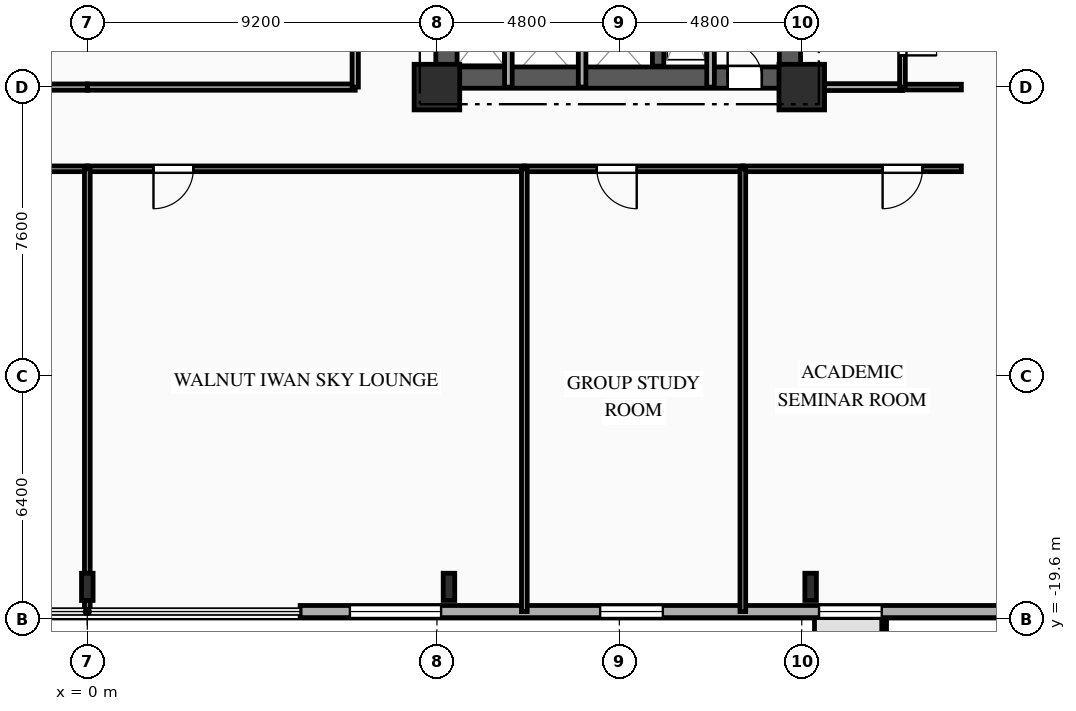
"""IFC4 building model, lengths in metres.
Left out: names, types, materials, properties, quantities, classifications, styles, units other than length and angle.
Written with IfcOpenShell. Run it as: python <this file> out.ifc"""

import sys

from ifc_helpers import new_model, si_unit, direction, frame, frame_2d, origin, origin_2d, place, context, subcontext, project, spatial, rectangle, i_section, extrude, element, fill, save


model = new_model("IFC4")
c1 = context("Model", 3, precision=1e-05, world=origin(), true_north=direction((0.0, 1.0)))
c2 = subcontext(c1, "Body", "Model", "MODEL_VIEW")
j1 = project(units=[si_unit("LENGTHUNIT", "METRE"), si_unit("PLANEANGLEUNIT", "RADIAN")], contexts=[c1])
p1 = place(None, origin())
s1 = spatial("IfcSite", under=j1, at=p1, CompositionType="ELEMENT")
p2 = place(p1, origin())
s2 = spatial("IfcBuilding", under=s1, at=p2, CompositionType="ELEMENT")
p3 = place(p2, frame((0.0, 0.0, 47.1)))
s3 = spatial("IfcBuildingStorey", under=s2, at=p3, CompositionType="ELEMENT", Elevation=47.1)
for number, where, z_axis, x_axis in (
    (1, (9.2, -5.6, 0.0), (0.0, 0.0, 1.0), (1.0, 0.0, 0.0)),
    (2, (18.8, -5.6, 0.0), (0.0, 0.0, 1.0), (1.0, 0.0, 0.0)),
):
    element("IfcColumn", number, at=place(p3, frame(where, z_axis=z_axis, x_axis=x_axis)), inside=s3, PredefinedType="COLUMN", context=c2, shape_type="SweptSolid", body=[
        extrude(rectangle(XDim=1.2, YDim=1.2, at=origin_2d()), origin(), (0.0, 0.0, 1.0), 3.35),
    ])
for number, where, z_axis, x_axis in (
    (3, (0.0, -18.75, 0.0), (0.0, 0.0, 1.0), (1.0, 0.0, 0.0)),
    (4, (9.517, -18.75, 0.0), (0.0, 0.0, 1.0), (1.0, 0.0, 0.0)),
    (5, (19.033, -18.75, 0.0), (0.0, 0.0, 1.0), (1.0, 0.0, 0.0)),
):
    element("IfcColumn", number, at=place(p3, frame(where, z_axis=z_axis, x_axis=x_axis)), inside=s3, PredefinedType="COLUMN", context=c2, shape_type="SweptSolid", body=[
        extrude(i_section(OverallWidth=0.304, OverallDepth=0.716, WebThickness=0.021, FlangeThickness=0.04, FilletRadius=0.027, at=origin_2d()), origin(), (0.0, 0.0, 1.0), 3.35),
    ])
p4 = place(p3, frame((29.2, -19.4, 0.0), z_axis=(0.0, 0.0, 1.0), x_axis=(-1.0, 0.0, 0.0)))
e6 = element("IfcWall", 6, at=p4, inside=s3, PredefinedType="SOLIDWALL", context=c2, shape_type="SweptSolid", body=[
    extrude(rectangle(XDim=23.6, YDim=0.32, at=frame_2d((11.8, 0.0))), origin(), (0.0, 0.0, 1.0), 3.035),
])
p5 = place(p4, frame((8.295, 0.0, 0.85)))
e7 = element("IfcOpeningElement", 7, at=p5, cuts=e6, PredefinedType="OPENING", context=c2, shape_type="SweptSolid", body=[
    extrude(rectangle(XDim=1.65, YDim=1.85, at=frame_2d((0.825, 0.925))), frame((0.0, 0.17, 0.0), z_axis=(0.0, -1.0, 0.0), x_axis=(1.0, 0.0, 0.0)), (0.0, 0.0, 1.0), 0.34),
])
p6 = place(p4, frame((14.055, 0.0, 0.85)))
e8 = element("IfcOpeningElement", 8, at=p6, cuts=e6, PredefinedType="OPENING", context=c2, shape_type="SweptSolid", body=[
    extrude(rectangle(XDim=1.65, YDim=1.85, at=frame_2d((0.825, 0.925))), frame((0.0, 0.17, 0.0), z_axis=(0.0, -1.0, 0.0), x_axis=(1.0, 0.0, 0.0)), (0.0, 0.0, 1.0), 0.34),
])
p7 = place(p4, frame((19.89, 0.0, 0.85)))
e9 = element("IfcOpeningElement", 9, at=p7, cuts=e6, PredefinedType="OPENING", context=c2, shape_type="SweptSolid", body=[
    extrude(rectangle(XDim=2.4, YDim=1.95, at=frame_2d((1.2, 0.975))), frame((0.0, 0.17, 0.0), z_axis=(0.0, -1.0, 0.0), x_axis=(1.0, 0.0, 0.0)), (0.0, 0.0, 1.0), 0.34),
])
p8 = place(p3, frame((9.2, -5.35, 0.0), z_axis=(0.0, 0.0, 1.0), x_axis=(1.0, 0.0, 0.0)))
e10 = element("IfcWall", 10, at=p8, inside=s3, PredefinedType="SHEAR", context=c2, shape_type="SweptSolid", body=[
    extrude(rectangle(XDim=9.6, YDim=0.56, at=frame_2d((4.8, 0.0))), origin(), (0.0, 0.0, 1.0), 3.035),
])
p9 = place(p8, frame((7.65, 0.0, 0.0)))
e11 = element("IfcOpeningElement", 11, at=p9, cuts=e10, PredefinedType="OPENING", context=c2, shape_type="SweptSolid", body=[
    extrude(rectangle(XDim=0.9, YDim=2.1, at=frame_2d((0.45, 1.05))), frame((0.0, 0.29, 0.0), z_axis=(0.0, -1.0, 0.0), x_axis=(1.0, 0.0, 0.0)), (0.0, 0.0, 1.0), 0.58),
])
p10 = place(p3, frame((9.45, -5.05, 0.0), z_axis=(0.0, 0.0, 1.0), x_axis=(0.0, 1.0, 0.0)))
e12 = element("IfcWall", 12, at=p10, inside=s3, PredefinedType="SHEAR", context=c2, shape_type="SweptSolid", body=[
    extrude(rectangle(XDim=10.1, YDim=0.56, at=frame_2d((5.05, 0.0))), origin(), (0.0, 0.0, 1.0), 3.035),
])
p11 = place(p10, frame((7.15, 0.0, 0.0)))
e13 = element("IfcOpeningElement", 13, at=p11, cuts=e12, PredefinedType="OPENING", context=c2, shape_type="SweptSolid", body=[
    extrude(rectangle(XDim=0.9, YDim=2.1, at=frame_2d((0.45, 1.05))), frame((0.0, 0.29, 0.0), z_axis=(0.0, -1.0, 0.0), x_axis=(1.0, 0.0, 0.0)), (0.0, 0.0, 1.0), 0.58),
])
p12 = place(p10, frame((2.4, 0.0, 0.0)))
e14 = element("IfcOpeningElement", 14, at=p12, cuts=e12, PredefinedType="OPENING", context=c2, shape_type="SweptSolid", body=[
    extrude(rectangle(XDim=1.2, YDim=2.15, at=frame_2d((0.6, 1.075))), frame((0.0, 0.29, 0.0), z_axis=(0.0, -1.0, 0.0), x_axis=(1.0, 0.0, 0.0)), (0.0, 0.0, 1.0), 0.58),
])
p13 = place(p3, frame((18.49, -5.05, 0.0), z_axis=(0.0, 0.0, 1.0), x_axis=(0.0, 1.0, 0.0)))
e15 = element("IfcWall", 15, at=p13, inside=s3, PredefinedType="SHEAR", context=c2, shape_type="SweptSolid", body=[
    extrude(rectangle(XDim=10.1, YDim=0.56, at=frame_2d((5.05, 0.0))), origin(), (0.0, 0.0, 1.0), 3.035),
])
p14 = place(p3, frame((15.02, -5.05, 0.0), z_axis=(0.0, 0.0, 1.0), x_axis=(0.0, 1.0, 0.0)))
e16 = element("IfcWall", 16, at=p14, inside=s3, PredefinedType="SHEAR", context=c2, shape_type="SweptSolid", body=[
    extrude(rectangle(XDim=10.1, YDim=0.3, at=frame_2d((5.05, 0.0))), origin(), (0.0, 0.0, 1.0), 3.035),
])
p15 = place(p3, frame((16.4, -2.11, 0.0), z_axis=(0.0, 0.0, 1.0), x_axis=(0.0, -1.0, 0.0)))
e17 = element("IfcWall", 17, at=p15, inside=s3, PredefinedType="PARTITIONING", context=c2, shape_type="SweptSolid", body=[
    extrude(rectangle(XDim=3.49, YDim=0.2, at=frame_2d((1.745, 0.0))), origin(), (0.0, 0.0, 1.0), 3.035),
])
for number, where, z_axis, x_axis in (
    (18, (11.08, -5.6, 0.0), (0.0, 0.0, 1.0), (0.0, 1.0, 0.0)),
    (19, (13.02, -5.6, 0.0), (0.0, 0.0, 1.0), (0.0, 1.0, 0.0)),
):
    element("IfcWall", number, at=place(p3, frame(where, z_axis=z_axis, x_axis=x_axis)), inside=s3, PredefinedType="PARTITIONING", context=c2, shape_type="SweptSolid", body=[
        extrude(rectangle(XDim=2.25, YDim=0.2, at=frame_2d((1.125, 0.0))), origin(), (0.0, 0.0, 1.0), 3.035),
    ])
p16 = place(p3, frame((0.0, -7.75, 0.0), z_axis=(0.0, 0.0, 1.0), x_axis=(-1.0, 0.0, 0.0)))
e20 = element("IfcWall", 20, at=p16, inside=s3, PredefinedType="PARTITIONING", context=c2, shape_type="SweptSolid", body=[
    extrude(rectangle(XDim=11.5, YDim=0.15, at=frame_2d((5.75, 0.0))), origin(), (0.0, 0.0, 1.0), 3.035),
])
p17 = place(p16, frame((1.741, 0.0, 0.0)))
e21 = element("IfcOpeningElement", 21, at=p17, cuts=e20, PredefinedType="OPENING", context=c2, shape_type="SweptSolid", body=[
    extrude(rectangle(XDim=1.05, YDim=2.15, at=frame_2d((0.525, 1.075))), frame((0.0, 0.085, 0.0), z_axis=(0.0, -1.0, 0.0), x_axis=(1.0, 0.0, 0.0)), (0.0, 0.0, 1.0), 0.17),
])
p18 = place(p3, frame((-7.05, -5.6, 0.0), z_axis=(0.0, 0.0, 1.0), x_axis=(1.0, 0.0, 0.0)))
e22 = element("IfcWall", 22, at=p18, inside=s3, PredefinedType="PARTITIONING", context=c2, shape_type="SweptSolid", body=[
    extrude(rectangle(XDim=7.05, YDim=0.165, at=frame_2d((3.525, 0.0))), origin(), (0.0, 0.0, 1.0), 2.52),
])
p19 = place(p18, frame((4.728, 0.0, 0.0)))
e23 = element("IfcOpeningElement", 23, at=p19, cuts=e22, PredefinedType="OPENING", context=c2, shape_type="SweptSolid", body=[
    extrude(rectangle(XDim=1.15, YDim=2.15, at=frame_2d((0.575, 1.075))), frame((0.0, 0.093, 0.0), z_axis=(0.0, -1.0, 0.0), x_axis=(1.0, 0.0, 0.0)), (0.0, 0.0, 1.0), 0.185),
])
p20 = place(p3, frame((18.8, -5.6, 0.0), z_axis=(0.0, 0.0, 1.0), x_axis=(1.0, 0.0, 0.0)))
e24 = element("IfcWall", 24, at=p20, inside=s3, PredefinedType="PARTITIONING", context=c2, shape_type="SweptSolid", body=[
    extrude(rectangle(XDim=2.65, YDim=0.18, at=frame_2d((1.325, 0.0))), origin(), (0.0, 0.0, 1.0), 3.035),
])
p21 = place(p3, frame((21.45, -5.6, 0.0), z_axis=(0.0, 0.0, 1.0), x_axis=(1.0, 0.0, 0.0)))
e25 = element("IfcWall", 25, at=p21, inside=s3, PredefinedType="PLUMBINGWALL", context=c2, shape_type="SweptSolid", body=[
    extrude(rectangle(XDim=1.55, YDim=0.15, at=frame_2d((0.775, 0.0))), origin(), (0.0, 0.0, 1.0), 3.035),
])
p22 = place(p3, frame((11.5, -7.75, 0.0), z_axis=(0.0, 0.0, 1.0), x_axis=(-1.0, 0.0, 0.0)))
e26 = element("IfcWall", 26, at=p22, inside=s3, PredefinedType="PARTITIONING", context=c2, shape_type="SweptSolid", body=[
    extrude(rectangle(XDim=11.5, YDim=0.15, at=frame_2d((5.75, 0.0))), origin(), (0.0, 0.0, 1.0), 3.035),
])
p23 = place(p22, frame((8.709, 0.0, 0.0)))
e27 = element("IfcOpeningElement", 27, at=p23, cuts=e26, PredefinedType="OPENING", context=c2, shape_type="SweptSolid", body=[
    extrude(rectangle(XDim=1.05, YDim=2.15, at=frame_2d((0.525, 1.075))), frame((0.0, 0.085, 0.0), z_axis=(0.0, -1.0, 0.0), x_axis=(1.0, 0.0, 0.0)), (0.0, 0.0, 1.0), 0.17),
])
p24 = place(p3, frame((17.25, -7.75, 0.0), z_axis=(0.0, 0.0, 1.0), x_axis=(-1.0, 0.0, 0.0)))
e28 = element("IfcWall", 28, at=p24, inside=s3, PredefinedType="PARTITIONING", context=c2, shape_type="SweptSolid", body=[
    extrude(rectangle(XDim=5.75, YDim=0.15, at=frame_2d((2.875, 0.0))), origin(), (0.0, 0.0, 1.0), 3.035),
])
p25 = place(p24, frame((2.792, 0.0, 0.0)))
e29 = element("IfcOpeningElement", 29, at=p25, cuts=e28, PredefinedType="OPENING", context=c2, shape_type="SweptSolid", body=[
    extrude(rectangle(XDim=1.05, YDim=2.15, at=frame_2d((0.525, 1.075))), frame((0.0, 0.085, 0.0), z_axis=(0.0, -1.0, 0.0), x_axis=(1.0, 0.0, 0.0)), (0.0, 0.0, 1.0), 0.17),
])
p26 = place(p3, frame((23.0, -7.75, 0.0), z_axis=(0.0, 0.0, 1.0), x_axis=(-1.0, 0.0, 0.0)))
e30 = element("IfcWall", 30, at=p26, inside=s3, PredefinedType="PARTITIONING", context=c2, shape_type="SweptSolid", body=[
    extrude(rectangle(XDim=5.75, YDim=0.15, at=frame_2d((2.875, 0.0))), origin(), (0.0, 0.0, 1.0), 3.035),
])
p27 = place(p26, frame((1.022, 0.0, 0.0)))
e31 = element("IfcOpeningElement", 31, at=p27, cuts=e30, PredefinedType="OPENING", context=c2, shape_type="SweptSolid", body=[
    extrude(rectangle(XDim=1.05, YDim=2.15, at=frame_2d((0.525, 1.075))), frame((0.0, 0.085, 0.0), z_axis=(0.0, -1.0, 0.0), x_axis=(1.0, 0.0, 0.0)), (0.0, 0.0, 1.0), 0.17),
])
p28 = place(p3, frame((0.0, -5.6, 0.0), z_axis=(0.0, 0.0, 1.0), x_axis=(1.0, 0.0, 0.0)))
e32 = element("IfcWall", 32, at=p28, inside=s3, PredefinedType="PARTITIONING", context=c2, shape_type="SweptSolid", body=[
    extrude(rectangle(XDim=7.05, YDim=0.165, at=frame_2d((3.525, 0.0))), origin(), (0.0, 0.0, 1.0), 2.52),
])
p29 = place(p3, frame((7.05, -5.6, 0.0), z_axis=(0.0, 0.0, 1.0), x_axis=(0.0, 1.0, 0.0)))
e33 = element("IfcWall", 33, at=p29, inside=s3, PredefinedType="PARTITIONING", context=c2, shape_type="SweptSolid", body=[
    extrude(rectangle(XDim=7.05, YDim=0.165, at=frame_2d((3.525, 0.0))), origin(), (0.0, 0.0, 1.0), 3.035),
])
p30 = place(p3, frame((21.45, -3.25, 0.0), z_axis=(0.0, 0.0, 1.0), x_axis=(0.0, -1.0, 0.0)))
e34 = element("IfcWall", 34, at=p30, inside=s3, PredefinedType="PLUMBINGWALL", context=c2, shape_type="SweptSolid", body=[
    extrude(rectangle(XDim=2.35, YDim=0.15, at=frame_2d((1.175, 0.0))), origin(), (0.0, 0.0, 1.0), 3.035),
])
p31 = place(p30, frame((0.616, 0.0, 0.0)))
e35 = element("IfcOpeningElement", 35, at=p31, cuts=e34, PredefinedType="OPENING", context=c2, shape_type="SweptSolid", body=[
    extrude(rectangle(XDim=0.9, YDim=2.1, at=frame_2d((0.45, 1.05))), frame((0.0, 0.085, 0.0), z_axis=(0.0, -1.0, 0.0), x_axis=(1.0, 0.0, 0.0)), (0.0, 0.0, 1.0), 0.17),
])
for number, where, z_axis, x_axis in (
    (36, (0.0, -7.75, 0.0), (0.0, 0.0, 1.0), (0.0, -1.0, 0.0)),
    (37, (11.5, -7.75, 0.0), (0.0, 0.0, 1.0), (0.0, -1.0, 0.0)),
    (38, (17.25, -7.75, 0.0), (0.0, 0.0, 1.0), (0.0, -1.0, 0.0)),
):
    element("IfcWall", number, at=place(p3, frame(where, z_axis=z_axis, x_axis=x_axis)), inside=s3, PredefinedType="PARTITIONING", context=c2, shape_type="SweptSolid", body=[
        extrude(rectangle(XDim=11.65, YDim=0.15, at=frame_2d((5.825, 0.0))), origin(), (0.0, 0.0, 1.0), 3.035),
    ])
p32 = place(p5, origin())
e39 = element("IfcWindow", 39, at=p32, inside=s3, PartitioningType="SINGLE_PANEL", PredefinedType="WINDOW", context=c2, shape_type="SweptSolid", body=[
    extrude(rectangle(XDim=1.65, YDim=1.85, at=frame_2d((0.825, 0.925))), frame((0.0, 0.03, 0.0), z_axis=(0.0, -1.0, 0.0), x_axis=(1.0, 0.0, 0.0)), (0.0, 0.0, 1.0), 0.06),
])
fill(e7, e39)
p33 = place(p6, origin())
e40 = element("IfcWindow", 40, at=p33, inside=s3, PartitioningType="SINGLE_PANEL", PredefinedType="WINDOW", context=c2, shape_type="SweptSolid", body=[
    extrude(rectangle(XDim=1.65, YDim=1.85, at=frame_2d((0.825, 0.925))), frame((0.0, 0.03, 0.0), z_axis=(0.0, -1.0, 0.0), x_axis=(1.0, 0.0, 0.0)), (0.0, 0.0, 1.0), 0.06),
])
fill(e8, e40)
p34 = place(p7, origin())
e41 = element("IfcWindow", 41, at=p34, inside=s3, PartitioningType="SINGLE_PANEL", PredefinedType="WINDOW", context=c2, shape_type="SweptSolid", body=[
    extrude(rectangle(XDim=2.4, YDim=1.95, at=frame_2d((1.2, 0.975))), frame((0.0, 0.03, 0.0), z_axis=(0.0, -1.0, 0.0), x_axis=(1.0, 0.0, 0.0)), (0.0, 0.0, 1.0), 0.06),
])
fill(e9, e41)
p35 = place(p9, origin())
e42 = element("IfcDoor", 42, at=p35, inside=s3, OperationType="SINGLE_SWING_LEFT", PredefinedType="DOOR", context=c2, shape_type="SweptSolid", body=[
    extrude(rectangle(XDim=0.9, YDim=2.1, at=frame_2d((0.45, 1.05))), frame((0.0, 0.025, 0.0), z_axis=(0.0, -1.0, 0.0), x_axis=(1.0, 0.0, 0.0)), (0.0, 0.0, 1.0), 0.05),
])
fill(e11, e42)
p36 = place(p23, origin())
e43 = element("IfcDoor", 43, at=p36, inside=s3, OperationType="SINGLE_SWING_RIGHT", PredefinedType="DOOR", context=c2, shape_type="SweptSolid", body=[
    extrude(rectangle(XDim=1.05, YDim=2.15, at=frame_2d((0.525, 1.075))), frame((0.0, 0.025, 0.0), z_axis=(0.0, -1.0, 0.0), x_axis=(1.0, 0.0, 0.0)), (0.0, 0.0, 1.0), 0.05),
])
fill(e27, e43)
p37 = place(p25, origin())
e44 = element("IfcDoor", 44, at=p37, inside=s3, OperationType="SINGLE_SWING_LEFT", PredefinedType="DOOR", context=c2, shape_type="SweptSolid", body=[
    extrude(rectangle(XDim=1.05, YDim=2.15, at=frame_2d((0.525, 1.075))), frame((0.0, 0.025, 0.0), z_axis=(0.0, -1.0, 0.0), x_axis=(1.0, 0.0, 0.0)), (0.0, 0.0, 1.0), 0.05),
])
fill(e29, e44)
p38 = place(p27, origin())
e45 = element("IfcDoor", 45, at=p38, inside=s3, OperationType="SINGLE_SWING_RIGHT", PredefinedType="DOOR", context=c2, shape_type="SweptSolid", body=[
    extrude(rectangle(XDim=1.05, YDim=2.15, at=frame_2d((0.525, 1.075))), frame((0.0, 0.025, 0.0), z_axis=(0.0, -1.0, 0.0), x_axis=(1.0, 0.0, 0.0)), (0.0, 0.0, 1.0), 0.05),
])
fill(e31, e45)
p39 = place(p31, origin())
e46 = element("IfcDoor", 46, at=p39, inside=s3, OperationType="SINGLE_SWING_RIGHT", PredefinedType="DOOR", context=c2, shape_type="SweptSolid", body=[
    extrude(rectangle(XDim=0.9, YDim=2.1, at=frame_2d((0.45, 1.05))), frame((0.0, 0.025, 0.0), z_axis=(0.0, -1.0, 0.0), x_axis=(1.0, 0.0, 0.0)), (0.0, 0.0, 1.0), 0.05),
])
fill(e35, e46)
save(model, sys.argv[1])
